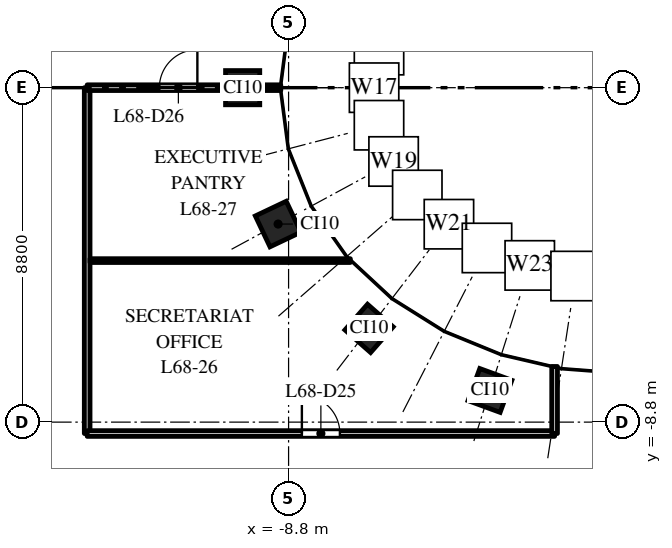
"""IFC4 building model, lengths in metres.
Left out: names, types, materials, properties, quantities, classifications, styles, units other than length and angle.
Written with IfcOpenShell. Run it as: python <this file> out.ifc"""

import sys

from ifc_helpers import new_model, si_unit, direction, frame, frame_2d, origin, origin_2d, place, context, subcontext, project, spatial, rectangle, extrude, element, fill, save


model = new_model("IFC4")
c1 = context("Model", 3, precision=1e-05, world=origin(), true_north=direction((0.0, 1.0)))
c2 = subcontext(c1, "Body", "Model", "MODEL_VIEW")
j1 = project(units=[si_unit("LENGTHUNIT", "METRE"), si_unit("PLANEANGLEUNIT", "RADIAN")], contexts=[c1])
p1 = place(None, origin())
s1 = spatial("IfcSite", under=j1, at=p1, CompositionType="ELEMENT")
p2 = place(p1, origin())
s2 = spatial("IfcBuilding", under=s1, at=p2, CompositionType="ELEMENT")
p3 = place(p2, frame((0.0, 0.0, 315.0)))
s3 = spatial("IfcBuildingStorey", under=s2, at=p3, CompositionType="ELEMENT", Elevation=315.0)
for number, where, z_axis, x_axis in (
    (1, (-10.008, 0.0, 0.0), (0.0, 0.0, 1.0), (0.0, -1.0, 0.0)),
    (2, (-9.076, -3.588, 0.0), (0.0, 0.0, 1.0), (0.429, -0.903, 0.0)),
    (3, (-6.682, -6.334, 0.0), (0.0, 0.0, 1.0), (0.751, -0.66, 0.0)),
    (4, (-3.501, -7.967, 0.0), (0.0, 0.0, 1.0), (0.939, -0.344, 0.0)),
):
    element("IfcColumn", number, at=place(p3, frame(where, z_axis=z_axis, x_axis=x_axis)), inside=s3, PredefinedType="COLUMN", context=c2, shape_type="SweptSolid", body=[
        extrude(rectangle(XDim=0.9, YDim=0.9, at=origin_2d()), origin(), (0.0, 0.0, 1.0), 4.0),
    ])
p4 = place(p3, frame((-14.1, -9.1, 0.0), z_axis=(0.0, 0.0, 1.0), x_axis=(0.0, 1.0, 0.0)))
e5 = element("IfcWall", 5, at=p4, inside=s3, PredefinedType="PARTITIONING", context=c2, shape_type="SweptSolid", body=[
    extrude(rectangle(XDim=9.1, YDim=0.15, at=frame_2d((4.55, 0.0))), origin(), (0.0, 0.0, 1.0), 3.7),
])
p5 = place(p3, frame((-14.1, -9.1, 0.0), z_axis=(0.0, 0.0, 1.0), x_axis=(1.0, 0.0, 0.0)))
e6 = element("IfcWall", 6, at=p5, inside=s3, PredefinedType="PARTITIONING", context=c2, shape_type="SweptSolid", body=[
    extrude(rectangle(XDim=12.3, YDim=0.15, at=frame_2d((6.15, 0.0))), origin(), (0.0, 0.0, 1.0), 2.75),
])
p6 = place(p5, frame((5.65, 0.0, 0.0)))
e7 = element("IfcOpeningElement", 7, at=p6, cuts=e6, PredefinedType="OPENING", context=c2, shape_type="SweptSolid", body=[
    extrude(rectangle(XDim=1.0, YDim=2.1, at=frame_2d((0.5, 1.05))), frame((0.0, 0.085, 0.0), z_axis=(0.0, -1.0, 0.0), x_axis=(1.0, 0.0, 0.0)), (0.0, 0.0, 1.0), 0.17),
])
p7 = place(p3, frame((-14.025, -4.55, 0.0), z_axis=(0.0, 0.0, 1.0), x_axis=(1.0, 0.0, 0.0)))
e8 = element("IfcWall", 8, at=p7, inside=s3, PredefinedType="PARTITIONING", context=c2, shape_type="SweptSolid", body=[
    extrude(rectangle(XDim=6.851, YDim=0.1, at=frame_2d((3.425, 0.0))), origin(), (0.0, 0.0, 1.0), 3.0),
])
p8 = place(p3, frame((-14.1, 0.0, 0.0), z_axis=(0.0, 0.0, 1.0), x_axis=(1.0, 0.0, 0.0)))
e9 = element("IfcWall", 9, at=p8, inside=s3, PredefinedType="PARTITIONING", context=c2, shape_type="SweptSolid", body=[
    extrude(rectangle(XDim=5.095, YDim=0.15, at=frame_2d((2.548, 0.0))), origin(), (0.0, 0.0, 1.0), 3.7),
])
p9 = place(p8, frame((1.9, 0.0, 0.0)))
e10 = element("IfcOpeningElement", 10, at=p9, cuts=e9, PredefinedType="OPENING", context=c2, shape_type="SweptSolid", body=[
    extrude(rectangle(XDim=1.0, YDim=2.1, at=frame_2d((0.5, 1.05))), frame((0.0, 0.085, 0.0), z_axis=(0.0, -1.0, 0.0), x_axis=(1.0, 0.0, 0.0)), (0.0, 0.0, 1.0), 0.17),
])
p10 = place(p3, frame((-1.8, -9.1, 0.0), z_axis=(0.0, 0.0, 1.0), x_axis=(0.0, 1.0, 0.0)))
e11 = element("IfcWall", 11, at=p10, inside=s3, PredefinedType="PARTITIONING", context=c2, shape_type="SweptSolid", body=[
    extrude(rectangle(XDim=1.764, YDim=0.15, at=frame_2d((0.882, 0.0))), origin(), (0.0, 0.0, 1.0), 3.0),
])
p11 = place(p6, origin())
e12 = element("IfcDoor", 12, at=p11, inside=s3, OperationType="SINGLE_SWING_LEFT", PredefinedType="DOOR", context=c2, shape_type="SweptSolid", body=[
    extrude(rectangle(XDim=1.0, YDim=2.1, at=frame_2d((0.5, 1.05))), frame((0.0, 0.025, 0.0), z_axis=(0.0, -1.0, 0.0), x_axis=(1.0, 0.0, 0.0)), (0.0, 0.0, 1.0), 0.05),
])
fill(e7, e12)
p12 = place(p9, origin())
e13 = element("IfcDoor", 13, at=p12, inside=s3, OperationType="SINGLE_SWING_RIGHT", PredefinedType="DOOR", context=c2, shape_type="SweptSolid", body=[
    extrude(rectangle(XDim=1.0, YDim=2.1, at=frame_2d((0.5, 1.05))), frame((0.0, 0.025, 0.0), z_axis=(0.0, -1.0, 0.0), x_axis=(1.0, 0.0, 0.0)), (0.0, 0.0, 1.0), 0.05),
])
fill(e10, e13)
save(model, sys.argv[1])
